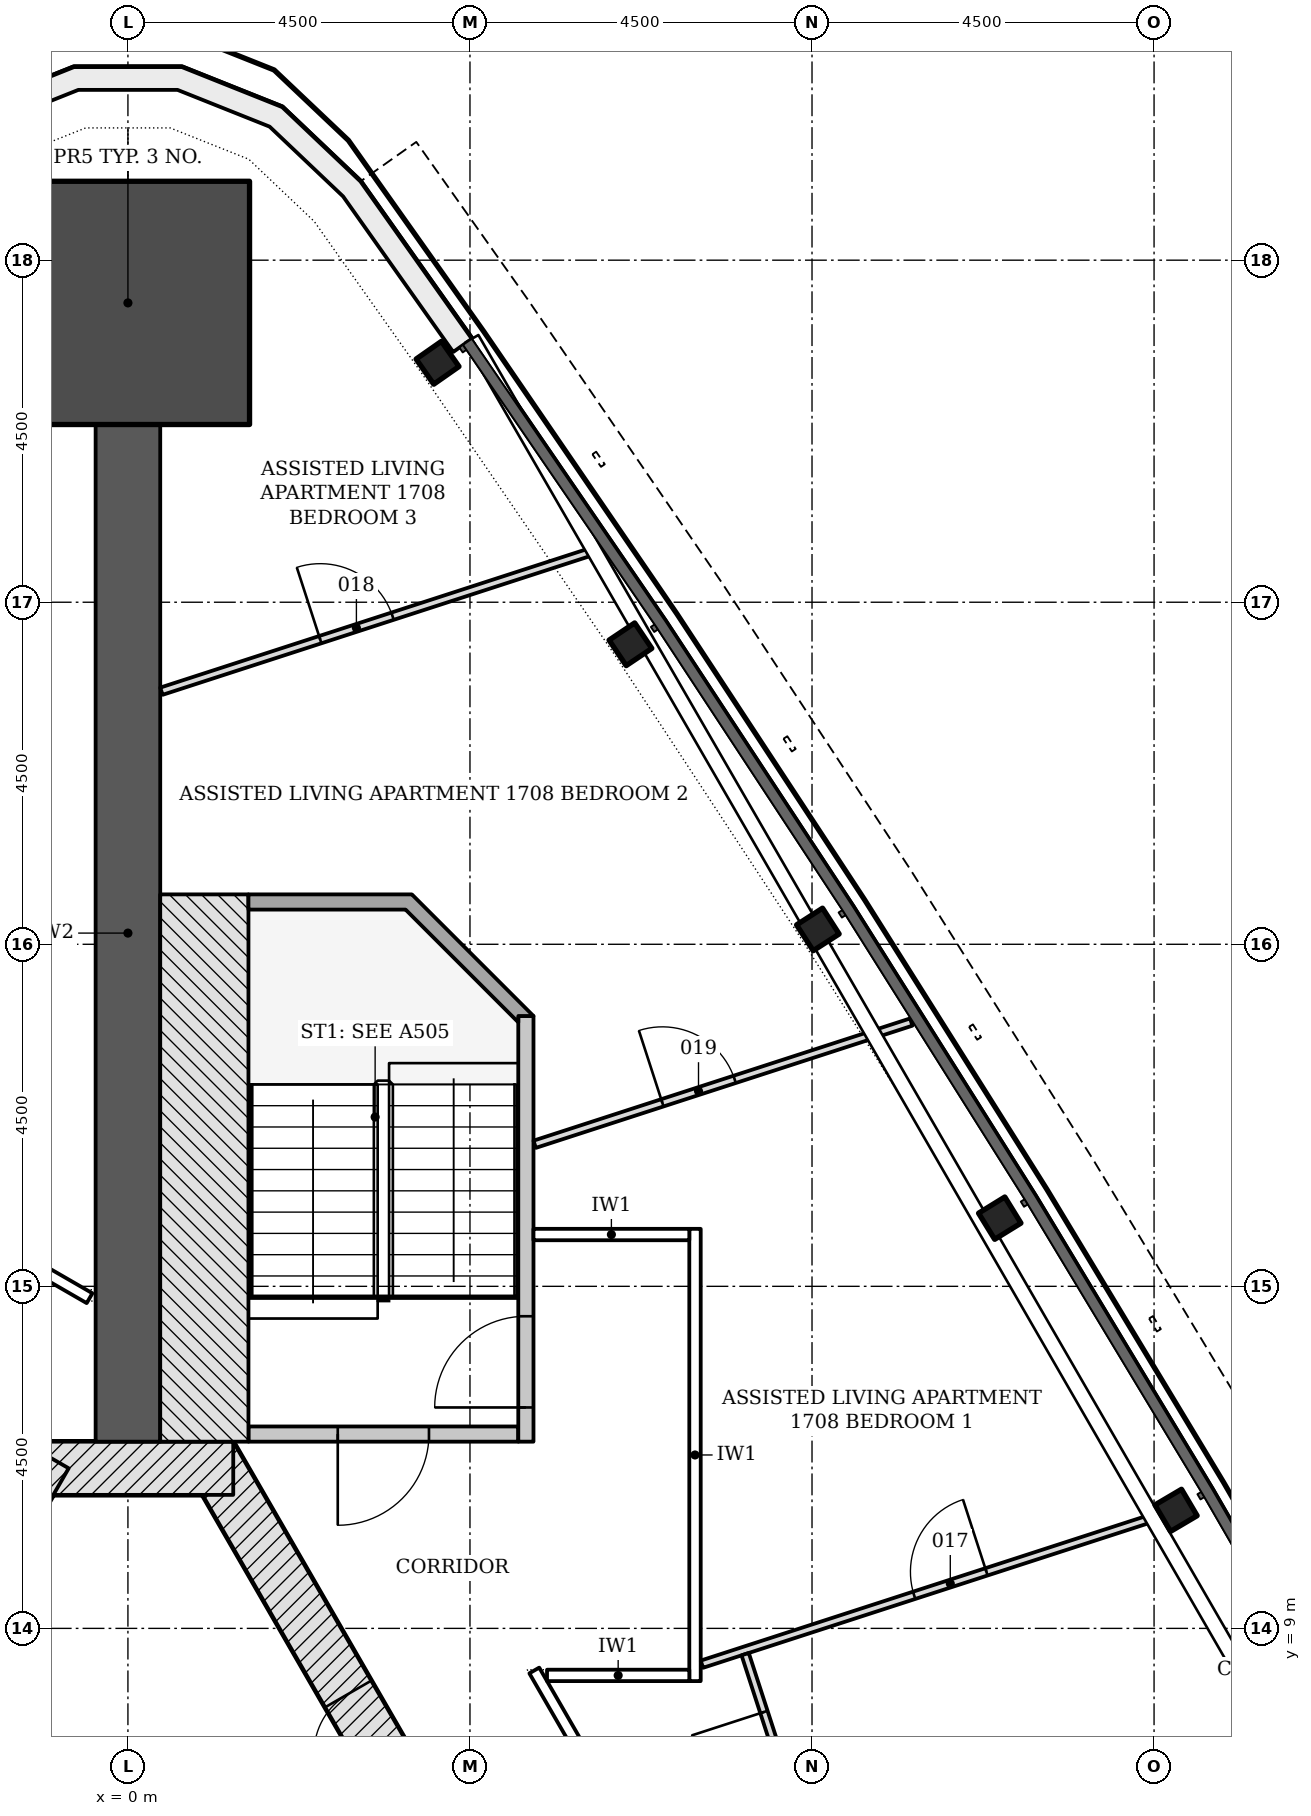
"""IFC4 building model, lengths in metres.
Left out: names, types, materials, properties, quantities, classifications, styles, units other than length and angle.
Written with IfcOpenShell. Run it as: python <this file> out.ifc"""

import sys

from ifc_helpers import new_model, si_unit, direction, frame, frame_2d, origin, origin_2d, place, context, subcontext, project, spatial, polyline, rectangle, i_section, outline, extrude, element, fill, save


model = new_model("IFC4")
c1 = context("Model", 3, precision=1e-05, world=origin(), true_north=direction((0.0, 1.0)))
c2 = subcontext(c1, "Body", "Model", "MODEL_VIEW")
j1 = project(units=[si_unit("LENGTHUNIT", "METRE"), si_unit("PLANEANGLEUNIT", "RADIAN")], contexts=[c1])
p1 = place(None, origin())
s1 = spatial("IfcSite", under=j1, at=p1, CompositionType="ELEMENT")
p2 = place(p1, origin())
s2 = spatial("IfcBuilding", under=s1, at=p2, CompositionType="ELEMENT")
p3 = place(p2, frame((0.0, 0.0, 69.0)))
s3 = spatial("IfcBuildingStorey", under=s2, at=p3, CompositionType="ELEMENT", Elevation=69.0)
p4 = place(p3, frame((10.311, -4.703, -0.2), z_axis=(0.0, 0.0, 1.0), x_axis=(-0.500001446645, 0.866024568562, 0.0)))
e1 = element("IfcWall", 1, at=p4, inside=s3, PredefinedType="SHEAR", context=c2, shape_type="SweptSolid", body=[
    extrude(rectangle(XDim=18.458, YDim=0.7, at=frame_2d((9.229, 0.0))), origin(), (0.0, 0.0, 1.0), 3.6),
])
p5 = place(p4, frame((9.5, 0.0, 0.2)))
e2 = element("IfcOpeningElement", 2, at=p5, cuts=e1, PredefinedType="OPENING", context=c2, shape_type="SweptSolid", body=[
    extrude(rectangle(XDim=1.0, YDim=2.1, at=frame_2d((0.5, 1.05))), frame((0.0, 0.36, 0.0), z_axis=(0.0, -1.0, 0.0), x_axis=(1.0, 0.0, 0.0)), (0.0, 0.0, 1.0), 0.72),
])
p6 = place(p4, frame((4.402, 0.0, 0.2)))
e3 = element("IfcOpeningElement", 3, at=p6, cuts=e1, PredefinedType="OPENING", context=c2, shape_type="SweptSolid", body=[
    extrude(rectangle(XDim=0.9, YDim=2.1, at=frame_2d((0.45, 1.05))), frame((0.0, 0.36, 0.0), z_axis=(0.0, -1.0, 0.0), x_axis=(1.0, 0.0, 0.0)), (0.0, 0.0, 1.0), 0.72),
])
p7 = place(p4, frame((13.927, 0.0, 0.2)))
e4 = element("IfcOpeningElement", 4, at=p7, cuts=e1, PredefinedType="OPENING", context=c2, shape_type="SweptSolid", body=[
    extrude(rectangle(XDim=0.9, YDim=2.1, at=frame_2d((0.45, 1.05))), frame((0.0, 0.36, 0.0), z_axis=(0.0, -1.0, 0.0), x_axis=(1.0, 0.0, 0.0)), (0.0, 0.0, 1.0), 0.72),
])
p8 = place(p3, frame((1.386, 11.106, -0.2), z_axis=(0.0, 0.0, 1.0), x_axis=(-1.0, 0.0, 0.0)))
e5 = element("IfcWall", 5, at=p8, inside=s3, PredefinedType="SHEAR", context=c2, shape_type="SweptSolid", body=[
    extrude(rectangle(XDim=2.771, YDim=0.7, at=frame_2d((1.386, 0.0))), origin(), (0.0, 0.0, 1.0), 3.6),
])
p9 = place(p3, frame((-1.083, 11.281, -0.2), z_axis=(0.0, 0.0, 1.0), x_axis=(-0.500001446645, -0.866024568562, 0.0)))
e6 = element("IfcWall", 6, at=p9, inside=s3, PredefinedType="SHEAR", context=c2, shape_type="SweptSolid", body=[
    extrude(rectangle(XDim=18.458, YDim=0.7, at=frame_2d((9.229, 0.0))), origin(), (0.0, 0.0, 1.0), 3.6),
])
p10 = place(p9, frame((8.979, 0.0, 0.2)))
e7 = element("IfcOpeningElement", 7, at=p10, cuts=e6, PredefinedType="OPENING", context=c2, shape_type="SweptSolid", body=[
    extrude(rectangle(XDim=1.2, YDim=2.1, at=frame_2d((0.6, 1.05))), frame((0.0, 0.36, 0.0), z_axis=(0.0, -1.0, 0.0), x_axis=(1.0, 0.0, 0.0)), (0.0, 0.0, 1.0), 0.72),
])
p11 = place(p9, frame((11.029, 0.0, 0.2)))
e8 = element("IfcOpeningElement", 8, at=p11, cuts=e6, PredefinedType="OPENING", context=c2, shape_type="SweptSolid", body=[
    extrude(rectangle(XDim=1.2, YDim=2.1, at=frame_2d((0.6, 1.05))), frame((0.0, 0.36, 0.0), z_axis=(0.0, -1.0, 0.0), x_axis=(1.0, 0.0, 0.0)), (0.0, 0.0, 1.0), 0.72),
])
p12 = place(p3, frame((0.0, 11.456, -0.2), z_axis=(0.0, 0.0, 1.0), x_axis=(0.0, 1.0, 0.0)))
e9 = element("IfcWall", 9, at=p12, inside=s3, PredefinedType="SHEAR", context=c2, shape_type="SweptSolid", body=[
    extrude(rectangle(XDim=13.382, YDim=0.85, at=frame_2d((6.691, 0.0))), origin(), (0.0, 0.0, 1.0), 3.6),
])
p13 = place(p3, frame((0.0, 26.438, -0.2), z_axis=(0.0, 0.0, 1.0), x_axis=(0.0, 1.0, 0.0)))
e10 = element("IfcColumn", 10, at=p13, inside=s3, PredefinedType="COLUMN", context=c2, shape_type="SweptSolid", body=[
    extrude(rectangle(XDim=3.2, YDim=3.2, at=origin_2d()), origin(), (0.0, 0.0, 1.0), 3.6),
])
for number, where, z_axis, x_axis in (
    (11, (13.789, 10.553, -0.2), (0.0, 0.0, 1.0), (-0.508, 0.861, 0.0)),
    (12, (11.47, 14.397, -0.2), (0.0, 0.0, 1.0), (-0.525, 0.851, 0.0)),
    (13, (9.077, 18.195, -0.2), (0.0, 0.0, 1.0), (-0.541, 0.841, 0.0)),
    (14, (6.611, 21.947, -0.2), (0.0, 0.0, 1.0), (-0.557, 0.83, 0.0)),
    (15, (4.073, 25.65, -0.2), (0.0, 0.0, 1.0), (-0.573, 0.819, 0.0)),
):
    element("IfcColumn", number, at=place(p3, frame(where, z_axis=z_axis, x_axis=x_axis)), inside=s3, PredefinedType="COLUMN", context=c2, shape_type="SweptSolid", body=[
        extrude(i_section(OverallWidth=0.404, OverallDepth=0.406, WebThickness=0.027, FlangeThickness=0.044, FilletRadius=0.015, at=origin_2d()), origin(), (0.0, 0.0, 1.0), 3.6),
    ])
p14 = place(p3, origin())
e16 = element("IfcWall", 16, at=p14, inside=s3, PredefinedType="NOTDEFINED", context=c2, shape_type="SweptSolid", body=[
    extrude(outline(polyline([(4.524, 25.965), (3.059, 28.036), (2.029, 29.014), (0.71, 29.54), (-0.71, 29.54), (-2.029, 29.014), (-3.059, 28.036), (-4.524, 25.965), (-4.279, 25.792), (-2.831, 27.839), (-1.865, 28.757), (-0.652, 29.24), (0.652, 29.24), (1.865, 28.757), (2.831, 27.839), (4.279, 25.792), (4.524, 25.965)])), origin(), (0.0, 0.0, 1.0), 3.3),
])
p15 = place(p3, frame((-2.506, 8.115, -0.2), z_axis=(0.0, 0.0, 1.0), x_axis=(0.865996321171, -0.50005036918, 0.0)))
e17 = element("IfcWall", 17, at=p15, inside=s3, PredefinedType="PARTITIONING", context=c2, shape_type="SweptSolid", body=[
    extrude(rectangle(XDim=2.9, YDim=0.25, at=frame_2d((1.45, 0.0))), origin(), (0.0, 0.0, 1.0), 3.6),
])
p16 = place(p3, frame((5.135, 11.556, -0.2), z_axis=(0.0, 0.0, 1.0), x_axis=(-1.0, 0.0, 0.0)))
e18 = element("IfcWall", 18, at=p16, inside=s3, PredefinedType="SHEAR", context=c2, shape_type="SweptSolid", body=[
    extrude(rectangle(XDim=3.55, YDim=0.2, at=frame_2d((1.775, 0.0))), origin(), (0.0, 0.0, 1.0), 3.6),
])
p17 = place(p16, frame((1.175, 0.0, 0.2)))
e19 = element("IfcOpeningElement", 19, at=p17, cuts=e18, PredefinedType="OPENING", context=c2, shape_type="SweptSolid", body=[
    extrude(rectangle(XDim=1.2, YDim=2.1, at=frame_2d((0.6, 1.05))), frame((0.0, 0.11, 0.0), z_axis=(0.0, -1.0, 0.0), x_axis=(1.0, 0.0, 0.0)), (0.0, 0.0, 1.0), 0.22),
])
p18 = place(p3, frame((5.236, 11.456, -0.2), z_axis=(0.0, 0.0, 1.0), x_axis=(0.0, 1.0, 0.0)))
e20 = element("IfcWall", 20, at=p18, inside=s3, PredefinedType="SHEAR", context=c2, shape_type="SweptSolid", body=[
    extrude(rectangle(XDim=5.6, YDim=0.2, at=frame_2d((2.8, 0.0))), origin(), (0.0, 0.0, 1.0), 3.6),
])
p19 = place(p18, frame((0.45, 0.0, 0.2)))
e21 = element("IfcOpeningElement", 21, at=p19, cuts=e20, PredefinedType="OPENING", context=c2, shape_type="SweptSolid", body=[
    extrude(rectangle(XDim=1.2, YDim=2.1, at=frame_2d((0.6, 1.05))), frame((0.0, 0.11, 0.0), z_axis=(0.0, -1.0, 0.0), x_axis=(1.0, 0.0, 0.0)), (0.0, 0.0, 1.0), 0.22),
])
p20 = place(p3, frame((1.005, 11.456, -0.2), z_axis=(0.0, 0.0, 1.0), x_axis=(0.0, 1.0, 0.0)))
e22 = element("IfcWall", 22, at=p20, inside=s3, PredefinedType="SHEAR", context=c2, shape_type="SweptSolid", body=[
    extrude(rectangle(XDim=7.2, YDim=1.161, at=frame_2d((3.6, 0.0))), origin(), (0.0, 0.0, 1.0), 3.6),
])
p21 = place(p3, frame((0.0, 0.0, -0.2)))
e23 = element("IfcWall", 23, at=p21, inside=s3, PredefinedType="SHEAR", context=c2, shape_type="SweptSolid", body=[
    extrude(outline(polyline([(5.336, 17.056), (3.736, 18.656), (1.586, 18.656), (1.586, 18.456), (3.653, 18.456), (5.135, 16.974), (5.135, 17.056), (5.135, 17.056), (5.135, 17.056), (5.135, 17.056), (5.135, 17.056), (5.135, 17.056), (5.135, 17.056), (5.135, 17.056), (5.135, 17.056), (5.135, 17.056), (5.135, 17.056), (5.135, 17.056), (5.135, 17.056), (5.135, 17.056), (5.135, 17.056), (5.135, 17.056), (5.135, 17.056), (5.336, 17.056)])), origin(), (0.0, 0.0, 1.0), 3.6),
])
p22 = place(p3, frame((5.346, 8.446, 0.0), z_axis=(0.0, 0.0, 1.0), x_axis=(0.500008781656, -0.866020333634, 0.0)))
e24 = element("IfcWall", 24, at=p22, inside=s3, PredefinedType="PARTITIONING", context=c2, shape_type="SweptSolid", body=[
    extrude(rectangle(XDim=15.057, YDim=0.15, at=frame_2d((7.528, 0.0))), origin(), (0.0, 0.0, 1.0), 2.778),
])
p23 = place(p22, frame((12.55, 0.0, 0.0)))
e25 = element("IfcOpeningElement", 25, at=p23, cuts=e24, PredefinedType="OPENING", context=c2, shape_type="SweptSolid", body=[
    extrude(rectangle(XDim=1.0, YDim=2.1, at=frame_2d((0.5, 1.05))), frame((0.0, 0.085, 0.0), z_axis=(0.0, -1.0, 0.0), x_axis=(1.0, 0.0, 0.0)), (0.0, 0.0, 1.0), 0.17),
])
p24 = place(p22, frame((6.753, 0.0, 0.0)))
e26 = element("IfcOpeningElement", 26, at=p24, cuts=e24, PredefinedType="OPENING", context=c2, shape_type="SweptSolid", body=[
    extrude(rectangle(XDim=1.0, YDim=2.1, at=frame_2d((0.5, 1.05))), frame((0.0, 0.085, 0.0), z_axis=(0.0, -1.0, 0.0), x_axis=(1.0, 0.0, 0.0)), (0.0, 0.0, 1.0), 0.17),
])
p25 = place(p3, frame((7.461, 8.306, 0.0), z_axis=(0.0, 0.0, 1.0), x_axis=(0.0, 1.0, 0.0)))
e27 = element("IfcWall", 27, at=p25, inside=s3, PredefinedType="PARTITIONING", context=c2, shape_type="SweptSolid", body=[
    extrude(rectangle(XDim=5.95, YDim=0.15, at=frame_2d((2.975, 0.0))), origin(), (0.0, 0.0, 1.0), 2.778),
])
p26 = place(p3, frame((-5.111, 16.003, 0.0), z_axis=(0.0, 0.0, 1.0), x_axis=(0.866034245675, -0.499984685083, 0.0)))
e28 = element("IfcWall", 28, at=p26, inside=s3, PredefinedType="PARTITIONING", context=c2, shape_type="SweptSolid", body=[
    extrude(rectangle(XDim=5.319, YDim=0.15, at=frame_2d((2.66, 0.0))), origin(), (0.0, 0.0, 1.0), 3.4),
])
p27 = place(p26, frame((2.084, 0.0, 0.0)))
e29 = element("IfcOpeningElement", 29, at=p27, cuts=e28, PredefinedType="OPENING", context=c2, shape_type="SweptSolid", body=[
    extrude(rectangle(XDim=1.0, YDim=2.1, at=frame_2d((0.5, 1.05))), frame((0.0, 0.085, 0.0), z_axis=(0.0, -1.0, 0.0), x_axis=(1.0, 0.0, 0.0)), (0.0, 0.0, 1.0), 0.17),
])
p28 = place(p3, frame((5.336, 14.181, 0.0), z_axis=(0.0, 0.0, 1.0), x_axis=(1.0, 0.0, 0.0)))
e30 = element("IfcWall", 30, at=p28, inside=s3, PredefinedType="PARTITIONING", context=c2, shape_type="SweptSolid", body=[
    extrude(rectangle(XDim=2.05, YDim=0.15, at=frame_2d((1.025, 0.0))), origin(), (0.0, 0.0, 1.0), 3.4),
])
p29 = place(p3, frame((5.514, 8.381, 0.0), z_axis=(0.0, 0.0, 1.0), x_axis=(1.0, 0.0, 0.0)))
e31 = element("IfcWall", 31, at=p29, inside=s3, PredefinedType="PARTITIONING", context=c2, shape_type="SweptSolid", body=[
    extrude(rectangle(XDim=1.872, YDim=0.15, at=frame_2d((0.936, 0.0))), origin(), (0.0, 0.0, 1.0), 3.4),
])
p30 = place(p3, frame((7.551, 8.529, 0.0), z_axis=(0.0, 0.0, 1.0), x_axis=(0.951171490306, 0.308662916511, 0.0)))
e32 = element("IfcWall", 32, at=p30, inside=s3, PredefinedType="PARTITIONING", context=c2, shape_type="SweptSolid", body=[
    extrude(rectangle(XDim=6.302, YDim=0.1, at=frame_2d((3.151, 0.0))), origin(), (0.0, 0.0, 1.0), 2.778),
])
p31 = place(p30, frame((2.936, 0.0, 0.0)))
e33 = element("IfcOpeningElement", 33, at=p31, cuts=e32, PredefinedType="OPENING", context=c2, shape_type="SweptSolid", body=[
    extrude(rectangle(XDim=1.0, YDim=2.1, at=frame_2d((0.5, 1.05))), frame((0.0, 0.06, 0.0), z_axis=(0.0, -1.0, 0.0), x_axis=(1.0, 0.0, 0.0)), (0.0, 0.0, 1.0), 0.12),
])
p32 = place(p3, frame((0.44, 21.329, 0.0), z_axis=(0.0, 0.0, 1.0), x_axis=(0.951171830883, 0.308661866992, 0.0)))
e34 = element("IfcWall", 34, at=p32, inside=s3, PredefinedType="PARTITIONING", context=c2, shape_type="SweptSolid", body=[
    extrude(rectangle(XDim=6.078, YDim=0.1, at=frame_2d((3.039, 0.0))), origin(), (0.0, 0.0, 1.0), 2.974),
])
p33 = place(p32, frame((2.197, 0.0, 0.0)))
e35 = element("IfcOpeningElement", 35, at=p33, cuts=e34, PredefinedType="OPENING", context=c2, shape_type="SweptSolid", body=[
    extrude(rectangle(XDim=1.0, YDim=2.1, at=frame_2d((0.5, 1.05))), frame((0.0, 0.06, 0.0), z_axis=(0.0, -1.0, 0.0), x_axis=(1.0, 0.0, 0.0)), (0.0, 0.0, 1.0), 0.12),
])
p34 = place(p3, frame((5.351, 15.369, 0.0), z_axis=(0.0, 0.0, 1.0), x_axis=(0.951165555735, 0.308681203807, 0.0)))
e36 = element("IfcWall", 36, at=p34, inside=s3, PredefinedType="PARTITIONING", context=c2, shape_type="SweptSolid", body=[
    extrude(rectangle(XDim=5.209, YDim=0.1, at=frame_2d((2.604, 0.0))), origin(), (0.0, 0.0, 1.0), 2.974),
])
p35 = place(p34, frame((1.766, 0.0, 0.0)))
e37 = element("IfcOpeningElement", 37, at=p35, cuts=e36, PredefinedType="OPENING", context=c2, shape_type="SweptSolid", body=[
    extrude(rectangle(XDim=1.0, YDim=2.1, at=frame_2d((0.5, 1.05))), frame((0.0, 0.06, 0.0), z_axis=(0.0, -1.0, 0.0), x_axis=(1.0, 0.0, 0.0)), (0.0, 0.0, 1.0), 0.12),
])
p36 = place(p3, frame((8.938, 6.14, 0.0), z_axis=(0.0, 0.0, 1.0), x_axis=(-0.308644385593, 0.951177503541, 0.0)))
e38 = element("IfcWall", 38, at=p36, inside=s3, PredefinedType="PARTITIONING", context=c2, shape_type="SweptSolid", body=[
    extrude(rectangle(XDim=2.65, YDim=0.1, at=frame_2d((1.325, 0.0))), origin(), (0.0, 0.0, 1.0), 2.778),
])
p37 = place(p36, frame((0.85, 0.0, 0.0)))
e39 = element("IfcOpeningElement", 39, at=p37, cuts=e38, PredefinedType="OPENING", context=c2, shape_type="SweptSolid", body=[
    extrude(rectangle(XDim=1.0, YDim=2.1, at=frame_2d((0.5, 1.05))), frame((0.0, 0.06, 0.0), z_axis=(0.0, -1.0, 0.0), x_axis=(1.0, 0.0, 0.0)), (0.0, 0.0, 1.0), 0.12),
])
p38 = place(p7, origin())
e40 = element("IfcDoor", 40, at=p38, inside=s3, OperationType="SINGLE_SWING_LEFT", PredefinedType="DOOR", context=c2, shape_type="SweptSolid", body=[
    extrude(rectangle(XDim=0.9, YDim=2.1, at=frame_2d((0.45, 1.05))), frame((0.0, 0.075, 0.0), z_axis=(0.0, -1.0, 0.0), x_axis=(1.0, 0.0, 0.0)), (0.0, 0.0, 1.0), 0.15),
])
fill(e4, e40)
p39 = place(p17, origin())
e41 = element("IfcDoor", 41, at=p39, inside=s3, OperationType="SINGLE_SWING_RIGHT", PredefinedType="DOOR", context=c2, shape_type="SweptSolid", body=[
    extrude(rectangle(XDim=1.2, YDim=2.1, at=frame_2d((0.6, 1.05))), frame((0.0, 0.025, 0.0), z_axis=(0.0, -1.0, 0.0), x_axis=(1.0, 0.0, 0.0)), (0.0, 0.0, 1.0), 0.05),
])
fill(e19, e41)
p40 = place(p19, origin())
e42 = element("IfcDoor", 42, at=p40, inside=s3, OperationType="SINGLE_SWING_LEFT", PredefinedType="DOOR", context=c2, shape_type="SweptSolid", body=[
    extrude(rectangle(XDim=1.2, YDim=2.1, at=frame_2d((0.6, 1.05))), frame((0.0, 0.025, 0.0), z_axis=(0.0, -1.0, 0.0), x_axis=(1.0, 0.0, 0.0)), (0.0, 0.0, 1.0), 0.05),
])
fill(e21, e42)
p41 = place(p31, origin())
e43 = element("IfcDoor", 43, at=p41, inside=s3, OperationType="SINGLE_SWING_RIGHT", PredefinedType="DOOR", context=c2, shape_type="SweptSolid", body=[
    extrude(rectangle(XDim=1.0, YDim=2.1, at=frame_2d((0.5, 1.05))), frame((0.0, 0.025, 0.0), z_axis=(0.0, -1.0, 0.0), x_axis=(1.0, 0.0, 0.0)), (0.0, 0.0, 1.0), 0.05),
])
fill(e33, e43)
p42 = place(p33, origin())
e44 = element("IfcDoor", 44, at=p42, inside=s3, OperationType="SINGLE_SWING_LEFT", PredefinedType="DOOR", context=c2, shape_type="SweptSolid", body=[
    extrude(rectangle(XDim=1.0, YDim=2.1, at=frame_2d((0.5, 1.05))), frame((0.0, 0.025, 0.0), z_axis=(0.0, -1.0, 0.0), x_axis=(1.0, 0.0, 0.0)), (0.0, 0.0, 1.0), 0.05),
])
fill(e35, e44)
p43 = place(p35, origin())
e45 = element("IfcDoor", 45, at=p43, inside=s3, OperationType="SINGLE_SWING_LEFT", PredefinedType="DOOR", context=c2, shape_type="SweptSolid", body=[
    extrude(rectangle(XDim=1.0, YDim=2.1, at=frame_2d((0.5, 1.05))), frame((0.0, 0.025, 0.0), z_axis=(0.0, -1.0, 0.0), x_axis=(1.0, 0.0, 0.0)), (0.0, 0.0, 1.0), 0.05),
])
fill(e37, e45)
p44 = place(p37, origin())
e46 = element("IfcDoor", 46, at=p44, inside=s3, OperationType="SINGLE_SWING_RIGHT", PredefinedType="DOOR", context=c2, shape_type="SweptSolid", body=[
    extrude(rectangle(XDim=1.0, YDim=2.1, at=frame_2d((0.5, 1.05))), frame((0.0, 0.025, 0.0), z_axis=(0.0, -1.0, 0.0), x_axis=(1.0, 0.0, 0.0)), (0.0, 0.0, 1.0), 0.05),
])
fill(e39, e46)
save(model, sys.argv[1])
